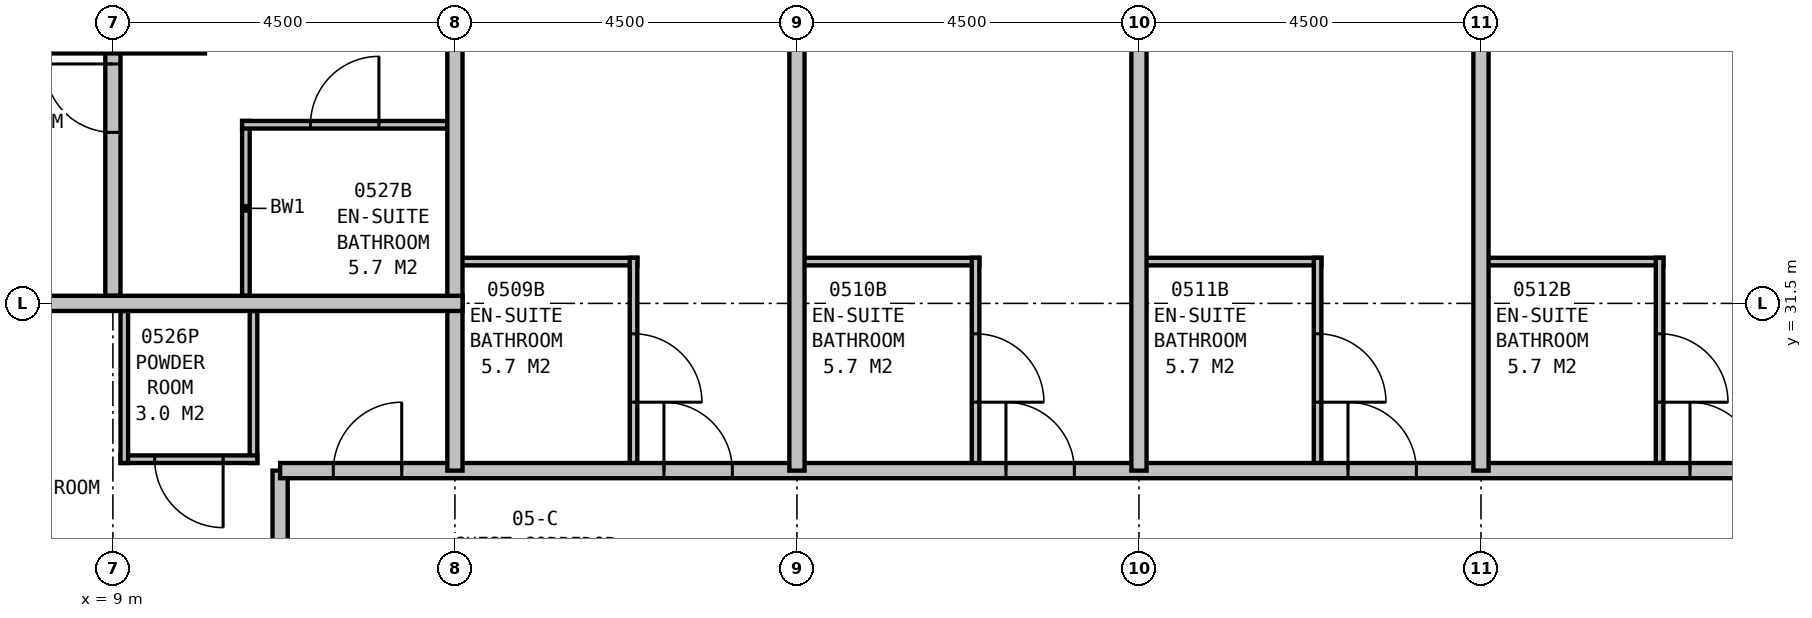
"""IFC4 building model, lengths in metres.
Left out: names, types, materials, properties, quantities, classifications, styles, units other than length and angle.
Written with IfcOpenShell. Run it as: python <this file> out.ifc"""

import sys

from ifc_helpers import new_model, si_unit, direction, frame, frame_2d, origin, place, context, subcontext, project, spatial, rectangle, extrude, element, fill, save


model = new_model("IFC4")
c1 = context("Model", 3, precision=1e-05, world=origin(), true_north=direction((0.0, 1.0)))
c2 = subcontext(c1, "Body", "Model", "MODEL_VIEW")
j1 = project(units=[si_unit("LENGTHUNIT", "METRE"), si_unit("PLANEANGLEUNIT", "RADIAN")], contexts=[c1])
p1 = place(None, origin())
s1 = spatial("IfcSite", under=j1, at=p1, CompositionType="ELEMENT")
p2 = place(p1, origin())
s2 = spatial("IfcBuilding", under=s1, at=p2, CompositionType="ELEMENT")
p3 = place(p2, frame((0.0, 0.0, 29.7)))
s3 = spatial("IfcBuildingStorey", under=s2, at=p3, CompositionType="ELEMENT", Elevation=29.7)
p4 = place(p3, frame((11.2, 29.3, 0.0), z_axis=(0.0, 0.0, 1.0), x_axis=(1.0, 0.0, 0.0)))
e1 = element("IfcWall", 1, at=p4, inside=s3, PredefinedType="PARTITIONING", context=c2, shape_type="SweptSolid", body=[
    extrude(rectangle(XDim=27.1, YDim=0.2, at=frame_2d((13.55, 0.0))), origin(), (0.0, 0.0, 1.0), 3.25),
])
p5 = place(p4, frame((5.05, 0.0, 0.0)))
e2 = element("IfcOpeningElement", 2, at=p5, cuts=e1, PredefinedType="OPENING", context=c2, shape_type="SweptSolid", body=[
    extrude(rectangle(XDim=0.9, YDim=2.1, at=frame_2d((0.45, 1.05))), frame((0.0, 0.11, 0.0), z_axis=(0.0, -1.0, 0.0), x_axis=(1.0, 0.0, 0.0)), (0.0, 0.0, 1.0), 0.22),
])
p6 = place(p4, frame((9.55, 0.0, 0.0)))
e3 = element("IfcOpeningElement", 3, at=p6, cuts=e1, PredefinedType="OPENING", context=c2, shape_type="SweptSolid", body=[
    extrude(rectangle(XDim=0.9, YDim=2.1, at=frame_2d((0.45, 1.05))), frame((0.0, 0.11, 0.0), z_axis=(0.0, -1.0, 0.0), x_axis=(1.0, 0.0, 0.0)), (0.0, 0.0, 1.0), 0.22),
])
p7 = place(p4, frame((14.05, 0.0, 0.0)))
e4 = element("IfcOpeningElement", 4, at=p7, cuts=e1, PredefinedType="OPENING", context=c2, shape_type="SweptSolid", body=[
    extrude(rectangle(XDim=0.9, YDim=2.1, at=frame_2d((0.45, 1.05))), frame((0.0, 0.11, 0.0), z_axis=(0.0, -1.0, 0.0), x_axis=(1.0, 0.0, 0.0)), (0.0, 0.0, 1.0), 0.22),
])
p8 = place(p4, frame((18.55, 0.0, 0.0)))
e5 = element("IfcOpeningElement", 5, at=p8, cuts=e1, PredefinedType="OPENING", context=c2, shape_type="SweptSolid", body=[
    extrude(rectangle(XDim=0.9, YDim=2.1, at=frame_2d((0.45, 1.05))), frame((0.0, 0.11, 0.0), z_axis=(0.0, -1.0, 0.0), x_axis=(1.0, 0.0, 0.0)), (0.0, 0.0, 1.0), 0.22),
])
p9 = place(p4, frame((23.05, 0.0, 0.0)))
e6 = element("IfcOpeningElement", 6, at=p9, cuts=e1, PredefinedType="OPENING", context=c2, shape_type="SweptSolid", body=[
    extrude(rectangle(XDim=0.9, YDim=2.1, at=frame_2d((0.45, 1.05))), frame((0.0, 0.11, 0.0), z_axis=(0.0, -1.0, 0.0), x_axis=(1.0, 0.0, 0.0)), (0.0, 0.0, 1.0), 0.22),
])
p10 = place(p4, frame((25.5, 0.0, 0.0)))
e7 = element("IfcOpeningElement", 7, at=p10, cuts=e1, PredefinedType="OPENING", context=c2, shape_type="SweptSolid", body=[
    extrude(rectangle(XDim=0.9, YDim=2.1, at=frame_2d((0.45, 1.05))), frame((0.0, 0.11, 0.0), z_axis=(0.0, -1.0, 0.0), x_axis=(1.0, 0.0, 0.0)), (0.0, 0.0, 1.0), 0.22),
])
p11 = place(p4, frame((0.7, 0.0, 0.0)))
e8 = element("IfcOpeningElement", 8, at=p11, cuts=e1, PredefinedType="OPENING", context=c2, shape_type="SweptSolid", body=[
    extrude(rectangle(XDim=0.9, YDim=2.1, at=frame_2d((0.45, 1.05))), frame((0.0, 0.11, 0.0), z_axis=(0.0, -1.0, 0.0), x_axis=(1.0, 0.0, 0.0)), (0.0, 0.0, 1.0), 0.22),
])
p12 = place(p3, frame((11.2, 11.2, 0.0), z_axis=(0.0, 0.0, 1.0), x_axis=(0.0, 1.0, 0.0)))
e9 = element("IfcWall", 9, at=p12, inside=s3, PredefinedType="PARTITIONING", context=c2, shape_type="SweptSolid", body=[
    extrude(rectangle(XDim=18.1, YDim=0.2, at=frame_2d((9.05, 0.0))), origin(), (0.0, 0.0, 1.0), 3.25),
])
p13 = place(p12, frame((5.05, 0.0, 0.0)))
e10 = element("IfcOpeningElement", 10, at=p13, cuts=e9, PredefinedType="OPENING", context=c2, shape_type="SweptSolid", body=[
    extrude(rectangle(XDim=0.9, YDim=2.1, at=frame_2d((0.45, 1.05))), frame((0.0, 0.11, 0.0), z_axis=(0.0, -1.0, 0.0), x_axis=(1.0, 0.0, 0.0)), (0.0, 0.0, 1.0), 0.22),
])
p14 = place(p12, frame((9.55, 0.0, 0.0)))
e11 = element("IfcOpeningElement", 11, at=p14, cuts=e9, PredefinedType="OPENING", context=c2, shape_type="SweptSolid", body=[
    extrude(rectangle(XDim=0.9, YDim=2.1, at=frame_2d((0.45, 1.05))), frame((0.0, 0.11, 0.0), z_axis=(0.0, -1.0, 0.0), x_axis=(1.0, 0.0, 0.0)), (0.0, 0.0, 1.0), 0.22),
])
p15 = place(p12, frame((12.0, 0.0, 0.0)))
e12 = element("IfcOpeningElement", 12, at=p15, cuts=e9, PredefinedType="OPENING", context=c2, shape_type="SweptSolid", body=[
    extrude(rectangle(XDim=1.0, YDim=2.1, at=frame_2d((0.5, 1.05))), frame((0.0, 0.11, 0.0), z_axis=(0.0, -1.0, 0.0), x_axis=(1.0, 0.0, 0.0)), (0.0, 0.0, 1.0), 0.22),
])
for number, where, z_axis, x_axis in (
    (13, (18.0, 29.3, 0.0), (0.0, 0.0, 1.0), (0.0, 1.0, 0.0)),
    (14, (22.5, 29.3, 0.0), (0.0, 0.0, 1.0), (0.0, 1.0, 0.0)),
    (15, (27.0, 29.3, 0.0), (0.0, 0.0, 1.0), (0.0, 1.0, 0.0)),
):
    element("IfcWall", number, at=place(p3, frame(where, z_axis=z_axis, x_axis=x_axis)), inside=s3, PredefinedType="PARTITIONING", context=c2, shape_type="SweptSolid", body=[
        extrude(rectangle(XDim=11.2, YDim=0.2, at=frame_2d((5.6, 0.0))), origin(), (0.0, 0.0, 1.0), 2.25),
    ])
p16 = place(p3, frame((13.5, 32.05, 0.0), z_axis=(0.0, 0.0, 1.0), x_axis=(1.0, 0.0, 0.0)))
e16 = element("IfcWall", 16, at=p16, inside=s3, PredefinedType="PLUMBINGWALL", context=c2, shape_type="SweptSolid", body=[
    extrude(rectangle(XDim=2.4, YDim=0.1, at=frame_2d((1.2, 0.0))), origin(), (0.0, 0.0, 1.0), 3.25),
])
p17 = place(p3, frame((15.85, 29.3, 0.0), z_axis=(0.0, 0.0, 1.0), x_axis=(0.0, 1.0, 0.0)))
e17 = element("IfcWall", 17, at=p17, inside=s3, PredefinedType="PLUMBINGWALL", context=c2, shape_type="SweptSolid", body=[
    extrude(rectangle(XDim=2.8, YDim=0.1, at=frame_2d((1.4, 0.0))), origin(), (0.0, 0.0, 1.0), 3.25),
])
p18 = place(p17, frame((1.8, 0.0, 0.0), z_axis=(0.0, 0.0, 1.0), x_axis=(-1.0, 0.0, 0.0)))
e18 = element("IfcOpeningElement", 18, at=p18, cuts=e17, PredefinedType="OPENING", context=c2, shape_type="SweptSolid", body=[
    extrude(rectangle(XDim=0.9, YDim=2.1, at=frame_2d((0.45, 1.05))), frame((0.0, 0.06, 0.0), z_axis=(0.0, -1.0, 0.0), x_axis=(1.0, 0.0, 0.0)), (0.0, 0.0, 1.0), 0.12),
])
p19 = place(p3, frame((18.0, 32.05, 0.0), z_axis=(0.0, 0.0, 1.0), x_axis=(1.0, 0.0, 0.0)))
e19 = element("IfcWall", 19, at=p19, inside=s3, PredefinedType="PLUMBINGWALL", context=c2, shape_type="SweptSolid", body=[
    extrude(rectangle(XDim=2.4, YDim=0.1, at=frame_2d((1.2, 0.0))), origin(), (0.0, 0.0, 1.0), 3.25),
])
p20 = place(p3, frame((20.35, 29.3, 0.0), z_axis=(0.0, 0.0, 1.0), x_axis=(0.0, 1.0, 0.0)))
e20 = element("IfcWall", 20, at=p20, inside=s3, PredefinedType="PLUMBINGWALL", context=c2, shape_type="SweptSolid", body=[
    extrude(rectangle(XDim=2.8, YDim=0.1, at=frame_2d((1.4, 0.0))), origin(), (0.0, 0.0, 1.0), 3.25),
])
p21 = place(p20, frame((1.8, 0.0, 0.0), z_axis=(0.0, 0.0, 1.0), x_axis=(-1.0, 0.0, 0.0)))
e21 = element("IfcOpeningElement", 21, at=p21, cuts=e20, PredefinedType="OPENING", context=c2, shape_type="SweptSolid", body=[
    extrude(rectangle(XDim=0.9, YDim=2.1, at=frame_2d((0.45, 1.05))), frame((0.0, 0.06, 0.0), z_axis=(0.0, -1.0, 0.0), x_axis=(1.0, 0.0, 0.0)), (0.0, 0.0, 1.0), 0.12),
])
p22 = place(p3, frame((22.5, 32.05, 0.0), z_axis=(0.0, 0.0, 1.0), x_axis=(1.0, 0.0, 0.0)))
e22 = element("IfcWall", 22, at=p22, inside=s3, PredefinedType="PLUMBINGWALL", context=c2, shape_type="SweptSolid", body=[
    extrude(rectangle(XDim=2.4, YDim=0.1, at=frame_2d((1.2, 0.0))), origin(), (0.0, 0.0, 1.0), 3.25),
])
p23 = place(p3, frame((24.85, 29.3, 0.0), z_axis=(0.0, 0.0, 1.0), x_axis=(0.0, 1.0, 0.0)))
e23 = element("IfcWall", 23, at=p23, inside=s3, PredefinedType="PLUMBINGWALL", context=c2, shape_type="SweptSolid", body=[
    extrude(rectangle(XDim=2.8, YDim=0.1, at=frame_2d((1.4, 0.0))), origin(), (0.0, 0.0, 1.0), 3.25),
])
p24 = place(p23, frame((1.8, 0.0, 0.0), z_axis=(0.0, 0.0, 1.0), x_axis=(-1.0, 0.0, 0.0)))
e24 = element("IfcOpeningElement", 24, at=p24, cuts=e23, PredefinedType="OPENING", context=c2, shape_type="SweptSolid", body=[
    extrude(rectangle(XDim=0.9, YDim=2.1, at=frame_2d((0.45, 1.05))), frame((0.0, 0.06, 0.0), z_axis=(0.0, -1.0, 0.0), x_axis=(1.0, 0.0, 0.0)), (0.0, 0.0, 1.0), 0.12),
])
p25 = place(p3, frame((27.0, 32.05, 0.0), z_axis=(0.0, 0.0, 1.0), x_axis=(1.0, 0.0, 0.0)))
e25 = element("IfcWall", 25, at=p25, inside=s3, PredefinedType="PLUMBINGWALL", context=c2, shape_type="SweptSolid", body=[
    extrude(rectangle(XDim=2.4, YDim=0.1, at=frame_2d((1.2, 0.0))), origin(), (0.0, 0.0, 1.0), 3.25),
])
p26 = place(p3, frame((29.35, 29.3, 0.0), z_axis=(0.0, 0.0, 1.0), x_axis=(0.0, 1.0, 0.0)))
e26 = element("IfcWall", 26, at=p26, inside=s3, PredefinedType="PLUMBINGWALL", context=c2, shape_type="SweptSolid", body=[
    extrude(rectangle(XDim=2.8, YDim=0.1, at=frame_2d((1.4, 0.0))), origin(), (0.0, 0.0, 1.0), 3.25),
])
p27 = place(p26, frame((1.8, 0.0, 0.0), z_axis=(0.0, 0.0, 1.0), x_axis=(-1.0, 0.0, 0.0)))
e27 = element("IfcOpeningElement", 27, at=p27, cuts=e26, PredefinedType="OPENING", context=c2, shape_type="SweptSolid", body=[
    extrude(rectangle(XDim=0.9, YDim=2.1, at=frame_2d((0.45, 1.05))), frame((0.0, 0.06, 0.0), z_axis=(0.0, -1.0, 0.0), x_axis=(1.0, 0.0, 0.0)), (0.0, 0.0, 1.0), 0.12),
])
p28 = place(p3, frame((13.5, 29.3, 0.0), z_axis=(0.0, 0.0, 1.0), x_axis=(0.0, 1.0, 0.0)))
e28 = element("IfcWall", 28, at=p28, inside=s3, PredefinedType="PARTITIONING", context=c2, shape_type="SweptSolid", body=[
    extrude(rectangle(XDim=11.2, YDim=0.2, at=frame_2d((5.6, 0.0))), origin(), (0.0, 0.0, 1.0), 2.25),
])
p29 = place(p3, frame((13.6, 31.5, 0.0), z_axis=(0.0, 0.0, 1.0), x_axis=(-1.0, 0.0, 0.0)))
e29 = element("IfcWall", 29, at=p29, inside=s3, PredefinedType="PARTITIONING", context=c2, shape_type="SweptSolid", body=[
    extrude(rectangle(XDim=10.099, YDim=0.2, at=frame_2d((5.05, 0.0))), origin(), (0.0, 0.0, 1.0), 3.25),
])
p30 = place(p29, frame((8.749, 0.0, 0.0), z_axis=(0.0, 0.0, 1.0), x_axis=(-1.0, 0.0, 0.0)))
e30 = element("IfcOpeningElement", 30, at=p30, cuts=e29, PredefinedType="OPENING", context=c2, shape_type="SweptSolid", body=[
    extrude(rectangle(XDim=0.9, YDim=2.1, at=frame_2d((0.45, 1.05))), frame((0.0, 0.11, 0.0), z_axis=(0.0, -1.0, 0.0), x_axis=(1.0, 0.0, 0.0)), (0.0, 0.0, 1.0), 0.22),
])
p31 = place(p3, frame((9.15, 31.4, 0.0), z_axis=(0.0, 0.0, 1.0), x_axis=(0.0, -1.0, 0.0)))
e31 = element("IfcWall", 31, at=p31, inside=s3, PredefinedType="PLUMBINGWALL", context=c2, shape_type="SweptSolid", body=[
    extrude(rectangle(XDim=2.0, YDim=0.1, at=frame_2d((1.0, 0.0))), origin(), (0.0, 0.0, 1.0), 2.25),
])
p32 = place(p3, frame((10.85, 31.4, 0.0), z_axis=(0.0, 0.0, 1.0), x_axis=(0.0, -1.0, 0.0)))
e32 = element("IfcWall", 32, at=p32, inside=s3, PredefinedType="PLUMBINGWALL", context=c2, shape_type="SweptSolid", body=[
    extrude(rectangle(XDim=2.0, YDim=0.1, at=frame_2d((1.0, 0.0))), origin(), (0.0, 0.0, 1.0), 3.25),
])
p33 = place(p3, frame((10.9, 29.45, 0.0), z_axis=(0.0, 0.0, 1.0), x_axis=(-1.0, 0.0, 0.0)))
e33 = element("IfcWall", 33, at=p33, inside=s3, PredefinedType="PLUMBINGWALL", context=c2, shape_type="SweptSolid", body=[
    extrude(rectangle(XDim=1.8, YDim=0.1, at=frame_2d((0.9, 0.0))), origin(), (0.0, 0.0, 1.0), 3.25),
])
p34 = place(p33, frame((0.45, 0.0, 0.0)))
e34 = element("IfcOpeningElement", 34, at=p34, cuts=e33, PredefinedType="OPENING", context=c2, shape_type="SweptSolid", body=[
    extrude(rectangle(XDim=0.9, YDim=2.1, at=frame_2d((0.45, 1.05))), frame((0.0, 0.06, 0.0), z_axis=(0.0, -1.0, 0.0), x_axis=(1.0, 0.0, 0.0)), (0.0, 0.0, 1.0), 0.12),
])
p35 = place(p3, frame((9.0, 31.6, 0.0), z_axis=(0.0, 0.0, 1.0), x_axis=(0.0, 1.0, 0.0)))
e35 = element("IfcWall", 35, at=p35, inside=s3, PredefinedType="PARTITIONING", context=c2, shape_type="SweptSolid", body=[
    extrude(rectangle(XDim=4.4, YDim=0.2, at=frame_2d((2.2, 0.0))), origin(), (0.0, 0.0, 1.0), 2.25),
])
p36 = place(p35, frame((2.15, 0.0, 0.0)))
e36 = element("IfcOpeningElement", 36, at=p36, cuts=e35, PredefinedType="OPENING", context=c2, shape_type="SweptSolid", body=[
    extrude(rectangle(XDim=0.9, YDim=2.1, at=frame_2d((0.45, 1.05))), frame((0.0, 0.11, 0.0), z_axis=(0.0, -1.0, 0.0), x_axis=(1.0, 0.0, 0.0)), (0.0, 0.0, 1.0), 0.22),
])
p37 = place(p3, frame((10.75, 31.6, 0.0), z_axis=(0.0, 0.0, 1.0), x_axis=(0.0, 1.0, 0.0)))
e37 = element("IfcWall", 37, at=p37, inside=s3, PredefinedType="PLUMBINGWALL", context=c2, shape_type="SweptSolid", body=[
    extrude(rectangle(XDim=2.3, YDim=0.1, at=frame_2d((1.15, 0.0))), origin(), (0.0, 0.0, 1.0), 3.25),
])
p38 = place(p3, frame((13.4, 33.85, 0.0), z_axis=(0.0, 0.0, 1.0), x_axis=(-1.0, 0.0, 0.0)))
e38 = element("IfcWall", 38, at=p38, inside=s3, PredefinedType="PLUMBINGWALL", context=c2, shape_type="SweptSolid", body=[
    extrude(rectangle(XDim=2.7, YDim=0.1, at=frame_2d((1.35, 0.0))), origin(), (0.0, 0.0, 1.0), 3.25),
])
p39 = place(p38, frame((1.8, 0.0, 0.0), z_axis=(0.0, 0.0, 1.0), x_axis=(-1.0, 0.0, 0.0)))
e39 = element("IfcOpeningElement", 39, at=p39, cuts=e38, PredefinedType="OPENING", context=c2, shape_type="SweptSolid", body=[
    extrude(rectangle(XDim=0.9, YDim=2.1, at=frame_2d((0.45, 1.05))), frame((0.0, 0.06, 0.0), z_axis=(0.0, -1.0, 0.0), x_axis=(1.0, 0.0, 0.0)), (0.0, 0.0, 1.0), 0.12),
])
p40 = place(p5, origin())
e40 = element("IfcDoor", 40, at=p40, inside=s3, OperationType="SINGLE_SWING_LEFT", PredefinedType="DOOR", context=c2, shape_type="SweptSolid", body=[
    extrude(rectangle(XDim=0.9, YDim=2.1, at=frame_2d((0.45, 1.05))), frame((0.0, 0.025, 0.0), z_axis=(0.0, -1.0, 0.0), x_axis=(1.0, 0.0, 0.0)), (0.0, 0.0, 1.0), 0.05),
])
fill(e2, e40)
p41 = place(p6, origin())
e41 = element("IfcDoor", 41, at=p41, inside=s3, OperationType="SINGLE_SWING_LEFT", PredefinedType="DOOR", context=c2, shape_type="SweptSolid", body=[
    extrude(rectangle(XDim=0.9, YDim=2.1, at=frame_2d((0.45, 1.05))), frame((0.0, 0.025, 0.0), z_axis=(0.0, -1.0, 0.0), x_axis=(1.0, 0.0, 0.0)), (0.0, 0.0, 1.0), 0.05),
])
fill(e3, e41)
p42 = place(p7, origin())
e42 = element("IfcDoor", 42, at=p42, inside=s3, OperationType="SINGLE_SWING_LEFT", PredefinedType="DOOR", context=c2, shape_type="SweptSolid", body=[
    extrude(rectangle(XDim=0.9, YDim=2.1, at=frame_2d((0.45, 1.05))), frame((0.0, 0.025, 0.0), z_axis=(0.0, -1.0, 0.0), x_axis=(1.0, 0.0, 0.0)), (0.0, 0.0, 1.0), 0.05),
])
fill(e4, e42)
p43 = place(p8, origin())
e43 = element("IfcDoor", 43, at=p43, inside=s3, OperationType="SINGLE_SWING_LEFT", PredefinedType="DOOR", context=c2, shape_type="SweptSolid", body=[
    extrude(rectangle(XDim=0.9, YDim=2.1, at=frame_2d((0.45, 1.05))), frame((0.0, 0.025, 0.0), z_axis=(0.0, -1.0, 0.0), x_axis=(1.0, 0.0, 0.0)), (0.0, 0.0, 1.0), 0.05),
])
fill(e5, e43)
p44 = place(p11, origin())
e44 = element("IfcDoor", 44, at=p44, inside=s3, OperationType="SINGLE_SWING_RIGHT", PredefinedType="DOOR", context=c2, shape_type="SweptSolid", body=[
    extrude(rectangle(XDim=0.9, YDim=2.1, at=frame_2d((0.45, 1.05))), frame((0.0, 0.025, 0.0), z_axis=(0.0, -1.0, 0.0), x_axis=(1.0, 0.0, 0.0)), (0.0, 0.0, 1.0), 0.05),
])
fill(e8, e44)
p45 = place(p18, origin())
e45 = element("IfcDoor", 45, at=p45, inside=s3, OperationType="SINGLE_SWING_RIGHT", PredefinedType="DOOR", context=c2, shape_type="SweptSolid", body=[
    extrude(rectangle(XDim=0.9, YDim=2.1, at=frame_2d((0.45, 1.05))), frame((0.0, 0.025, 0.0), z_axis=(0.0, -1.0, 0.0), x_axis=(1.0, 0.0, 0.0)), (0.0, 0.0, 1.0), 0.05),
])
fill(e18, e45)
p46 = place(p21, origin())
e46 = element("IfcDoor", 46, at=p46, inside=s3, OperationType="SINGLE_SWING_RIGHT", PredefinedType="DOOR", context=c2, shape_type="SweptSolid", body=[
    extrude(rectangle(XDim=0.9, YDim=2.1, at=frame_2d((0.45, 1.05))), frame((0.0, 0.025, 0.0), z_axis=(0.0, -1.0, 0.0), x_axis=(1.0, 0.0, 0.0)), (0.0, 0.0, 1.0), 0.05),
])
fill(e21, e46)
p47 = place(p24, origin())
e47 = element("IfcDoor", 47, at=p47, inside=s3, OperationType="SINGLE_SWING_RIGHT", PredefinedType="DOOR", context=c2, shape_type="SweptSolid", body=[
    extrude(rectangle(XDim=0.9, YDim=2.1, at=frame_2d((0.45, 1.05))), frame((0.0, 0.025, 0.0), z_axis=(0.0, -1.0, 0.0), x_axis=(1.0, 0.0, 0.0)), (0.0, 0.0, 1.0), 0.05),
])
fill(e24, e47)
p48 = place(p27, origin())
e48 = element("IfcDoor", 48, at=p48, inside=s3, OperationType="SINGLE_SWING_RIGHT", PredefinedType="DOOR", context=c2, shape_type="SweptSolid", body=[
    extrude(rectangle(XDim=0.9, YDim=2.1, at=frame_2d((0.45, 1.05))), frame((0.0, 0.025, 0.0), z_axis=(0.0, -1.0, 0.0), x_axis=(1.0, 0.0, 0.0)), (0.0, 0.0, 1.0), 0.05),
])
fill(e27, e48)
p49 = place(p34, origin())
e49 = element("IfcDoor", 49, at=p49, inside=s3, OperationType="SINGLE_SWING_LEFT", PredefinedType="DOOR", context=c2, shape_type="SweptSolid", body=[
    extrude(rectangle(XDim=0.9, YDim=2.1, at=frame_2d((0.45, 1.05))), frame((0.0, 0.025, 0.0), z_axis=(0.0, -1.0, 0.0), x_axis=(1.0, 0.0, 0.0)), (0.0, 0.0, 1.0), 0.05),
])
fill(e34, e49)
p50 = place(p36, origin())
e50 = element("IfcDoor", 50, at=p50, inside=s3, OperationType="SINGLE_SWING_RIGHT", PredefinedType="DOOR", context=c2, shape_type="SweptSolid", body=[
    extrude(rectangle(XDim=0.9, YDim=2.1, at=frame_2d((0.45, 1.05))), frame((0.0, 0.025, 0.0), z_axis=(0.0, -1.0, 0.0), x_axis=(1.0, 0.0, 0.0)), (0.0, 0.0, 1.0), 0.05),
])
fill(e36, e50)
p51 = place(p39, origin())
e51 = element("IfcDoor", 51, at=p51, inside=s3, OperationType="SINGLE_SWING_RIGHT", PredefinedType="DOOR", context=c2, shape_type="SweptSolid", body=[
    extrude(rectangle(XDim=0.9, YDim=2.1, at=frame_2d((0.45, 1.05))), frame((0.0, 0.025, 0.0), z_axis=(0.0, -1.0, 0.0), x_axis=(1.0, 0.0, 0.0)), (0.0, 0.0, 1.0), 0.05),
])
fill(e39, e51)
save(model, sys.argv[1])
